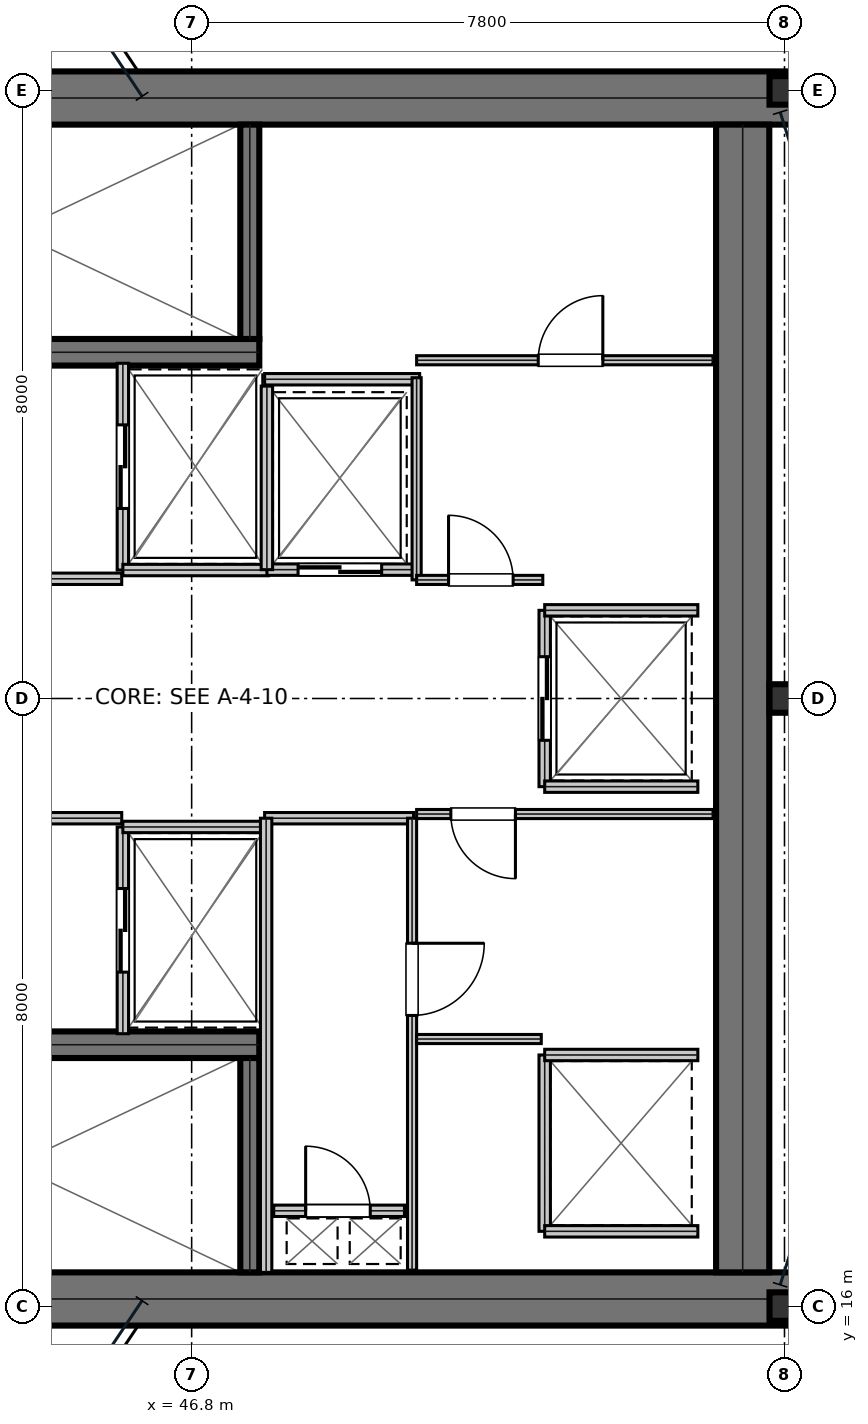
"""IFC4 building model, lengths in metres.
Left out: names, types, materials, properties, quantities, classifications, styles, units other than length and angle.
Written with IfcOpenShell. Run it as: python <this file> out.ifc"""

import sys

from ifc_helpers import new_model, si_unit, direction, frame, frame_2d, origin, origin_2d, place, context, subcontext, project, spatial, rectangle, i_section, extrude, element, fill, save


model = new_model("IFC4")
c1 = context("Model", 3, precision=1e-05, world=origin(), true_north=direction((0.0, 1.0)))
c2 = subcontext(c1, "Body", "Model", "MODEL_VIEW")
j1 = project(units=[si_unit("LENGTHUNIT", "METRE"), si_unit("PLANEANGLEUNIT", "RADIAN")], contexts=[c1])
p1 = place(None, origin())
s1 = spatial("IfcSite", under=j1, at=p1, CompositionType="ELEMENT")
p2 = place(p1, origin())
s2 = spatial("IfcBuilding", under=s1, at=p2, CompositionType="ELEMENT")
p3 = place(p2, frame((0.0, 0.0, 208.05)))
s3 = spatial("IfcBuildingStorey", under=s2, at=p3, CompositionType="ELEMENT", Elevation=208.05)
for number, where, z_axis, x_axis in (
    (1, (38.8, 31.9, 0.0), (0.0, 0.0, 1.0), (1.0, 0.0, 0.0)),
    (2, (38.8, 16.1, 0.0), (0.0, 0.0, 1.0), (1.0, 0.0, 0.0)),
):
    element("IfcWall", number, at=place(p3, frame(where, z_axis=z_axis, x_axis=x_axis)), inside=s3, PredefinedType="SHEAR", context=c2, shape_type="SweptSolid", body=[
        extrude(rectangle(XDim=16.0, YDim=0.7, at=frame_2d((8.0, 0.0))), origin(), (0.0, 0.0, 1.0), 3.79),
    ])
p4 = place(p3, frame((54.05, 16.45, 0.0), z_axis=(0.0, 0.0, 1.0), x_axis=(0.0, 1.0, 0.0)))
e3 = element("IfcWall", 3, at=p4, inside=s3, PredefinedType="SHEAR", context=c2, shape_type="SweptSolid", body=[
    extrude(rectangle(XDim=15.1, YDim=0.7, at=frame_2d((7.55, 0.0))), origin(), (0.0, 0.0, 1.0), 3.79),
])
p5 = place(p3, frame((39.98, 28.555, 0.0), z_axis=(0.0, 0.0, 1.0), x_axis=(1.0, 0.0, 0.0)))
e4 = element("IfcWall", 4, at=p5, inside=s3, PredefinedType="SHEAR", context=c2, shape_type="SweptSolid", body=[
    extrude(rectangle(XDim=7.71, YDim=0.35, at=frame_2d((3.855, 0.0))), origin(), (0.0, 0.0, 1.0), 3.79),
])
p6 = place(p5, frame((0.25, 0.0, 0.0)))
e5 = element("IfcOpeningElement", 5, at=p6, cuts=e4, PredefinedType="OPENING", context=c2, shape_type="SweptSolid", body=[
    extrude(rectangle(XDim=1.1, YDim=2.15, at=frame_2d((0.55, 1.075))), frame((0.0, 0.185, 0.0), z_axis=(0.0, -1.0, 0.0), x_axis=(1.0, 0.0, 0.0)), (0.0, 0.0, 1.0), 0.37),
])
p7 = place(p3, frame((39.98, 19.445, 0.0), z_axis=(0.0, 0.0, 1.0), x_axis=(1.0, 0.0, 0.0)))
e6 = element("IfcWall", 6, at=p7, inside=s3, PredefinedType="SHEAR", context=c2, shape_type="SweptSolid", body=[
    extrude(rectangle(XDim=7.71, YDim=0.35, at=frame_2d((3.855, 0.0))), origin(), (0.0, 0.0, 1.0), 3.79),
])
p8 = place(p7, frame((0.25, 0.0, 0.0)))
e7 = element("IfcOpeningElement", 7, at=p8, cuts=e6, PredefinedType="OPENING", context=c2, shape_type="SweptSolid", body=[
    extrude(rectangle(XDim=1.1, YDim=2.15, at=frame_2d((0.55, 1.075))), frame((0.0, 0.185, 0.0), z_axis=(0.0, -1.0, 0.0), x_axis=(1.0, 0.0, 0.0)), (0.0, 0.0, 1.0), 0.37),
])
for number, where, z_axis, x_axis in (
    (8, (47.565, 28.73, 0.0), (0.0, 0.0, 1.0), (0.0, 1.0, 0.0)),
    (9, (47.565, 16.45, 0.0), (0.0, 0.0, 1.0), (0.0, 1.0, 0.0)),
):
    element("IfcWall", number, at=place(p3, frame(where, z_axis=z_axis, x_axis=x_axis)), inside=s3, PredefinedType="SHEAR", context=c2, shape_type="SweptSolid", body=[
        extrude(rectangle(XDim=2.82, YDim=0.25, at=frame_2d((1.41, 0.0))), origin(), (0.0, 0.0, 1.0), 3.79),
    ])
for number, where, z_axis, x_axis in (
    (10, (54.6, 16.0, 0.0), (0.0, 0.0, 1.0), (1.0, 0.0, 0.0)),
    (11, (54.6, 24.0, 0.0), (0.0, 0.0, 1.0), (1.0, 0.0, 0.0)),
    (12, (54.6, 32.0, 0.0), (0.0, 0.0, 1.0), (1.0, 0.0, 0.0)),
):
    element("IfcColumn", number, at=place(p3, frame(where, z_axis=z_axis, x_axis=x_axis)), inside=s3, PredefinedType="COLUMN", context=c2, shape_type="SweptSolid", body=[
        extrude(i_section(OverallWidth=0.394, OverallDepth=0.375, WebThickness=0.017, FlangeThickness=0.028, at=origin_2d()), origin(), (0.0, 0.0, 1.0), 4.044),
    ])
p9 = place(p3, frame((39.98, 25.575, 0.0), z_axis=(0.0, 0.0, 1.0), x_axis=(1.0, 0.0, 0.0)))
e13 = element("IfcWall", 13, at=p9, inside=s3, PredefinedType="PARTITIONING", context=c2, shape_type="SweptSolid", body=[
    extrude(rectangle(XDim=5.9, YDim=0.15, at=frame_2d((2.95, 0.0))), origin(), (0.0, 0.0, 1.0), 3.79),
])
p10 = place(p9, frame((2.35, 0.0, 0.0)))
e14 = element("IfcOpeningElement", 14, at=p10, cuts=e13, PredefinedType="OPENING", context=c2, shape_type="SweptSolid", body=[
    extrude(rectangle(XDim=1.05, YDim=2.15, at=frame_2d((0.525, 1.075))), frame((0.0, 0.085, 0.0), z_axis=(0.0, -1.0, 0.0), x_axis=(1.0, 0.0, 0.0)), (0.0, 0.0, 1.0), 0.17),
])
p11 = place(p3, frame((39.98, 22.425, 0.0), z_axis=(0.0, 0.0, 1.0), x_axis=(1.0, 0.0, 0.0)))
e15 = element("IfcWall", 15, at=p11, inside=s3, PredefinedType="PARTITIONING", context=c2, shape_type="SweptSolid", body=[
    extrude(rectangle(XDim=5.9, YDim=0.15, at=frame_2d((2.95, 0.0))), origin(), (0.0, 0.0, 1.0), 3.79),
])
p12 = place(p11, frame((2.35, 0.0, 0.0)))
e16 = element("IfcOpeningElement", 16, at=p12, cuts=e15, PredefinedType="OPENING", context=c2, shape_type="SweptSolid", body=[
    extrude(rectangle(XDim=1.05, YDim=2.15, at=frame_2d((0.525, 1.075))), frame((0.0, 0.085, 0.0), z_axis=(0.0, -1.0, 0.0), x_axis=(1.0, 0.0, 0.0)), (0.0, 0.0, 1.0), 0.17),
])
p13 = place(p3, frame((45.895, 25.69, 0.0), z_axis=(0.0, 0.0, 1.0), x_axis=(0.0, 1.0, 0.0)))
e17 = element("IfcWall", 17, at=p13, inside=s3, PredefinedType="PARTITIONING", context=c2, shape_type="SweptSolid", body=[
    extrude(rectangle(XDim=2.72, YDim=0.15, at=frame_2d((1.36, 0.0))), origin(), (0.0, 0.0, 1.0), 3.79),
])
p14 = place(p13, frame((0.81, 0.0, 0.0)))
e18 = element("IfcOpeningElement", 18, at=p14, cuts=e17, PredefinedType="OPENING", context=c2, shape_type="SweptSolid", body=[
    extrude(rectangle(XDim=1.1, YDim=2.15, at=frame_2d((0.55, 1.075))), frame((0.0, 0.085, 0.0), z_axis=(0.0, -1.0, 0.0), x_axis=(1.0, 0.0, 0.0)), (0.0, 0.0, 1.0), 0.17),
])
p15 = place(p3, frame((45.895, 25.69, 0.0), z_axis=(0.0, 0.0, 1.0), x_axis=(1.0, 0.0, 0.0)))
e19 = element("IfcWall", 19, at=p15, inside=s3, PredefinedType="PARTITIONING", context=c2, shape_type="SweptSolid", body=[
    extrude(rectangle(XDim=1.915, YDim=0.15, at=frame_2d((0.958, 0.0))), origin(), (0.0, 0.0, 1.0), 3.79),
])
p16 = place(p3, frame((45.895, 19.59, 0.0), z_axis=(0.0, 0.0, 1.0), x_axis=(0.0, 1.0, 0.0)))
e20 = element("IfcWall", 20, at=p16, inside=s3, PredefinedType="PARTITIONING", context=c2, shape_type="SweptSolid", body=[
    extrude(rectangle(XDim=2.72, YDim=0.15, at=frame_2d((1.36, 0.0))), origin(), (0.0, 0.0, 1.0), 3.79),
])
p17 = place(p16, frame((0.81, 0.0, 0.0)))
e21 = element("IfcOpeningElement", 21, at=p17, cuts=e20, PredefinedType="OPENING", context=c2, shape_type="SweptSolid", body=[
    extrude(rectangle(XDim=1.1, YDim=2.15, at=frame_2d((0.55, 1.075))), frame((0.0, 0.085, 0.0), z_axis=(0.0, -1.0, 0.0), x_axis=(1.0, 0.0, 0.0)), (0.0, 0.0, 1.0), 0.17),
])
p18 = place(p3, frame((45.895, 22.31, 0.0), z_axis=(0.0, 0.0, 1.0), x_axis=(1.0, 0.0, 0.0)))
e22 = element("IfcWall", 22, at=p18, inside=s3, PredefinedType="PARTITIONING", context=c2, shape_type="SweptSolid", body=[
    extrude(rectangle(XDim=1.915, YDim=0.15, at=frame_2d((0.958, 0.0))), origin(), (0.0, 0.0, 1.0), 3.79),
])
p19 = place(p3, frame((47.79, 25.695, 0.0), z_axis=(0.0, 0.0, 1.0), x_axis=(1.0, 0.0, 0.0)))
e23 = element("IfcWall", 23, at=p19, inside=s3, PredefinedType="PARTITIONING", context=c2, shape_type="SweptSolid", body=[
    extrude(rectangle(XDim=1.92, YDim=0.15, at=frame_2d((0.96, 0.0))), origin(), (0.0, 0.0, 1.0), 3.79),
])
p20 = place(p19, frame((0.41, 0.0, 0.0)))
e24 = element("IfcOpeningElement", 24, at=p20, cuts=e23, PredefinedType="OPENING", context=c2, shape_type="SweptSolid", body=[
    extrude(rectangle(XDim=1.1, YDim=2.15, at=frame_2d((0.55, 1.075))), frame((0.0, 0.085, 0.0), z_axis=(0.0, -1.0, 0.0), x_axis=(1.0, 0.0, 0.0)), (0.0, 0.0, 1.0), 0.17),
])
p21 = place(p3, frame((47.79, 25.695, 0.0), z_axis=(0.0, 0.0, 1.0), x_axis=(0.0, 1.0, 0.0)))
e25 = element("IfcWall", 25, at=p21, inside=s3, PredefinedType="PARTITIONING", context=c2, shape_type="SweptSolid", body=[
    extrude(rectangle(XDim=2.415, YDim=0.15, at=frame_2d((1.208, 0.0))), origin(), (0.0, 0.0, 1.0), 3.79),
])
p22 = place(p3, frame((51.445, 22.84, 0.0), z_axis=(0.0, 0.0, 1.0), x_axis=(0.0, 1.0, 0.0)))
e26 = element("IfcWall", 26, at=p22, inside=s3, PredefinedType="PARTITIONING", context=c2, shape_type="SweptSolid", body=[
    extrude(rectangle(XDim=2.32, YDim=0.15, at=frame_2d((1.16, 0.0))), origin(), (0.0, 0.0, 1.0), 3.79),
])
p23 = place(p22, frame((0.61, 0.0, 0.0)))
e27 = element("IfcOpeningElement", 27, at=p23, cuts=e26, PredefinedType="OPENING", context=c2, shape_type="SweptSolid", body=[
    extrude(rectangle(XDim=1.1, YDim=2.15, at=frame_2d((0.55, 1.075))), frame((0.0, 0.085, 0.0), z_axis=(0.0, -1.0, 0.0), x_axis=(1.0, 0.0, 0.0)), (0.0, 0.0, 1.0), 0.17),
])
for number, where, z_axis, x_axis in (
    (28, (51.445, 22.84, 0.0), (0.0, 0.0, 1.0), (1.0, 0.0, 0.0)),
    (29, (51.445, 25.16, 0.0), (0.0, 0.0, 1.0), (1.0, 0.0, 0.0)),
):
    element("IfcWall", number, at=place(p3, frame(where, z_axis=z_axis, x_axis=x_axis)), inside=s3, PredefinedType="PARTITIONING", context=c2, shape_type="SweptSolid", body=[
        extrude(rectangle(XDim=2.015, YDim=0.15, at=frame_2d((1.007, 0.0))), origin(), (0.0, 0.0, 1.0), 3.79),
    ])
p24 = place(p3, frame((51.445, 16.99, 0.0), z_axis=(0.0, 0.0, 1.0), x_axis=(0.0, 1.0, 0.0)))
e30 = element("IfcWall", 30, at=p24, inside=s3, PredefinedType="PARTITIONING", context=c2, shape_type="SweptSolid", body=[
    extrude(rectangle(XDim=2.32, YDim=0.15, at=frame_2d((1.16, 0.0))), origin(), (0.0, 0.0, 1.0), 3.79),
])
for number, where, z_axis, x_axis in (
    (31, (51.445, 16.99, 0.0), (0.0, 0.0, 1.0), (1.0, 0.0, 0.0)),
    (32, (51.445, 19.31, 0.0), (0.0, 0.0, 1.0), (1.0, 0.0, 0.0)),
):
    element("IfcWall", number, at=place(p3, frame(where, z_axis=z_axis, x_axis=x_axis)), inside=s3, PredefinedType="PARTITIONING", context=c2, shape_type="SweptSolid", body=[
        extrude(rectangle(XDim=2.015, YDim=0.15, at=frame_2d((1.007, 0.0))), origin(), (0.0, 0.0, 1.0), 3.79),
    ])
p25 = place(p3, frame((47.88, 17.26, 0.0), z_axis=(0.0, 0.0, 1.0), x_axis=(1.0, 0.0, 0.0)))
e33 = element("IfcWall", 33, at=p25, inside=s3, PredefinedType="PARTITIONING", context=c2, shape_type="SweptSolid", body=[
    extrude(rectangle(XDim=1.72, YDim=0.15, at=frame_2d((0.86, 0.0))), origin(), (0.0, 0.0, 1.0), 3.79),
])
p26 = place(p25, frame((0.42, 0.0, 0.0)))
e34 = element("IfcOpeningElement", 34, at=p26, cuts=e33, PredefinedType="OPENING", context=c2, shape_type="SweptSolid", body=[
    extrude(rectangle(XDim=0.85, YDim=2.15, at=frame_2d((0.425, 1.075))), frame((0.0, 0.085, 0.0), z_axis=(0.0, -1.0, 0.0), x_axis=(1.0, 0.0, 0.0)), (0.0, 0.0, 1.0), 0.17),
])
p27 = place(p3, frame((47.76, 22.425, 0.0), z_axis=(0.0, 0.0, 1.0), x_axis=(1.0, 0.0, 0.0)))
e35 = element("IfcWall", 35, at=p27, inside=s3, PredefinedType="PARTITIONING", context=c2, shape_type="SweptSolid", body=[
    extrude(rectangle(XDim=1.96, YDim=0.15, at=frame_2d((0.98, 0.0))), origin(), (0.0, 0.0, 1.0), 3.79),
])
p28 = place(p3, frame((47.78, 16.45, 0.0), z_axis=(0.0, 0.0, 1.0), x_axis=(0.0, 1.0, 0.0)))
e36 = element("IfcWall", 36, at=p28, inside=s3, PredefinedType="PARTITIONING", context=c2, shape_type="SweptSolid", body=[
    extrude(rectangle(XDim=5.975, YDim=0.15, at=frame_2d((2.988, 0.0))), origin(), (0.0, 0.0, 1.0), 3.79),
])
p29 = place(p3, frame((49.7, 16.48, 0.0), z_axis=(0.0, 0.0, 1.0), x_axis=(0.0, 1.0, 0.0)))
e37 = element("IfcWall", 37, at=p29, inside=s3, PredefinedType="PARTITIONING", context=c2, shape_type="SweptSolid", body=[
    extrude(rectangle(XDim=5.945, YDim=0.12, at=frame_2d((2.973, 0.0))), origin(), (0.0, 0.0, 1.0), 3.79),
])
p30 = place(p29, frame((3.35, 0.0, 0.0)))
e38 = element("IfcOpeningElement", 38, at=p30, cuts=e37, PredefinedType="OPENING", context=c2, shape_type="SweptSolid", body=[
    extrude(rectangle(XDim=0.95, YDim=2.15, at=frame_2d((0.475, 1.075))), frame((0.0, 0.07, 0.0), z_axis=(0.0, -1.0, 0.0), x_axis=(1.0, 0.0, 0.0)), (0.0, 0.0, 1.0), 0.14),
])
p31 = place(p3, frame((49.76, 22.48, 0.0), z_axis=(0.0, 0.0, 1.0), x_axis=(1.0, 0.0, 0.0)))
e39 = element("IfcWall", 39, at=p31, inside=s3, PredefinedType="PARTITIONING", context=c2, shape_type="SweptSolid", body=[
    extrude(rectangle(XDim=3.9, YDim=0.12, at=frame_2d((1.95, 0.0))), origin(), (0.0, 0.0, 1.0), 3.79),
])
p32 = place(p31, frame((0.45, 0.0, 0.0)))
e40 = element("IfcOpeningElement", 40, at=p32, cuts=e39, PredefinedType="OPENING", context=c2, shape_type="SweptSolid", body=[
    extrude(rectangle(XDim=0.85, YDim=2.15, at=frame_2d((0.425, 1.075))), frame((0.0, 0.07, 0.0), z_axis=(0.0, -1.0, 0.0), x_axis=(1.0, 0.0, 0.0)), (0.0, 0.0, 1.0), 0.14),
])
p33 = place(p3, frame((49.76, 19.52, 0.0), z_axis=(0.0, 0.0, 1.0), x_axis=(1.0, 0.0, 0.0)))
e41 = element("IfcWall", 41, at=p33, inside=s3, PredefinedType="PARTITIONING", context=c2, shape_type="SweptSolid", body=[
    extrude(rectangle(XDim=1.64, YDim=0.12, at=frame_2d((0.82, 0.0))), origin(), (0.0, 0.0, 1.0), 3.79),
])
p34 = place(p3, frame((47.76, 28.2, 0.0), z_axis=(0.0, 0.0, 1.0), x_axis=(1.0, 0.0, 0.0)))
e42 = element("IfcWall", 42, at=p34, inside=s3, PredefinedType="PARTITIONING", context=c2, shape_type="SweptSolid", body=[
    extrude(rectangle(XDim=2.04, YDim=0.15, at=frame_2d((1.02, 0.0))), origin(), (0.0, 0.0, 1.0), 3.79),
])
p35 = place(p3, frame((49.76, 25.56, 0.0), z_axis=(0.0, 0.0, 1.0), x_axis=(0.0, 1.0, 0.0)))
e43 = element("IfcWall", 43, at=p35, inside=s3, PredefinedType="PARTITIONING", context=c2, shape_type="SweptSolid", body=[
    extrude(rectangle(XDim=2.66, YDim=0.12, at=frame_2d((1.33, 0.0))), origin(), (0.0, 0.0, 1.0), 3.79),
])
p36 = place(p3, frame((49.76, 25.56, 0.0), z_axis=(0.0, 0.0, 1.0), x_axis=(1.0, 0.0, 0.0)))
e44 = element("IfcWall", 44, at=p36, inside=s3, PredefinedType="PARTITIONING", context=c2, shape_type="SweptSolid", body=[
    extrude(rectangle(XDim=1.66, YDim=0.12, at=frame_2d((0.83, 0.0))), origin(), (0.0, 0.0, 1.0), 3.79),
])
p37 = place(p36, frame((0.42, 0.0, 0.0)))
e45 = element("IfcOpeningElement", 45, at=p37, cuts=e44, PredefinedType="OPENING", context=c2, shape_type="SweptSolid", body=[
    extrude(rectangle(XDim=0.85, YDim=2.15, at=frame_2d((0.425, 1.075))), frame((0.0, 0.07, 0.0), z_axis=(0.0, -1.0, 0.0), x_axis=(1.0, 0.0, 0.0)), (0.0, 0.0, 1.0), 0.14),
])
p38 = place(p3, frame((49.76, 28.45, 0.0), z_axis=(0.0, 0.0, 1.0), x_axis=(1.0, 0.0, 0.0)))
e46 = element("IfcWall", 46, at=p38, inside=s3, PredefinedType="PARTITIONING", context=c2, shape_type="SweptSolid", body=[
    extrude(rectangle(XDim=3.9, YDim=0.12, at=frame_2d((1.95, 0.0))), origin(), (0.0, 0.0, 1.0), 3.79),
])
p39 = place(p38, frame((1.6, 0.0, 0.0)))
e47 = element("IfcOpeningElement", 47, at=p39, cuts=e46, PredefinedType="OPENING", context=c2, shape_type="SweptSolid", body=[
    extrude(rectangle(XDim=0.85, YDim=2.15, at=frame_2d((0.425, 1.075))), frame((0.0, 0.07, 0.0), z_axis=(0.0, -1.0, 0.0), x_axis=(1.0, 0.0, 0.0)), (0.0, 0.0, 1.0), 0.14),
])
p40 = place(p14, frame((1.1, 0.0, 0.0), z_axis=(0.0, 0.0, 1.0), x_axis=(-1.0, 0.0, 0.0)))
e48 = element("IfcDoor", 48, at=p40, inside=s3, OperationType="DOUBLE_DOOR_SLIDING", PredefinedType="DOOR", context=c2, shape_type="SweptSolid", body=[
    extrude(rectangle(XDim=1.1, YDim=2.15, at=frame_2d((0.55, 1.075))), frame((0.0, 0.025, 0.0), z_axis=(0.0, -1.0, 0.0), x_axis=(1.0, 0.0, 0.0)), (0.0, 0.0, 1.0), 0.05),
])
fill(e18, e48)
p41 = place(p17, frame((1.1, 0.0, 0.0), z_axis=(0.0, 0.0, 1.0), x_axis=(-1.0, 0.0, 0.0)))
e49 = element("IfcDoor", 49, at=p41, inside=s3, OperationType="DOUBLE_DOOR_SLIDING", PredefinedType="DOOR", context=c2, shape_type="SweptSolid", body=[
    extrude(rectangle(XDim=1.1, YDim=2.15, at=frame_2d((0.55, 1.075))), frame((0.0, 0.025, 0.0), z_axis=(0.0, -1.0, 0.0), x_axis=(1.0, 0.0, 0.0)), (0.0, 0.0, 1.0), 0.05),
])
fill(e21, e49)
p42 = place(p20, frame((1.1, 0.0, 0.0), z_axis=(0.0, 0.0, 1.0), x_axis=(-1.0, 0.0, 0.0)))
e50 = element("IfcDoor", 50, at=p42, inside=s3, OperationType="DOUBLE_DOOR_SLIDING", PredefinedType="DOOR", context=c2, shape_type="SweptSolid", body=[
    extrude(rectangle(XDim=1.1, YDim=2.15, at=frame_2d((0.55, 1.075))), frame((0.0, 0.025, 0.0), z_axis=(0.0, -1.0, 0.0), x_axis=(1.0, 0.0, 0.0)), (0.0, 0.0, 1.0), 0.05),
])
fill(e24, e50)
p43 = place(p23, frame((1.1, 0.0, 0.0), z_axis=(0.0, 0.0, 1.0), x_axis=(-1.0, 0.0, 0.0)))
e51 = element("IfcDoor", 51, at=p43, inside=s3, OperationType="DOUBLE_DOOR_SLIDING", PredefinedType="DOOR", context=c2, shape_type="SweptSolid", body=[
    extrude(rectangle(XDim=1.1, YDim=2.15, at=frame_2d((0.55, 1.075))), frame((0.0, 0.025, 0.0), z_axis=(0.0, -1.0, 0.0), x_axis=(1.0, 0.0, 0.0)), (0.0, 0.0, 1.0), 0.05),
])
fill(e27, e51)
p44 = place(p26, origin())
e52 = element("IfcDoor", 52, at=p44, inside=s3, OperationType="SINGLE_SWING_LEFT", PredefinedType="TRAPDOOR", context=c2, shape_type="SweptSolid", body=[
    extrude(rectangle(XDim=0.85, YDim=2.15, at=frame_2d((0.425, 1.075))), frame((0.0, 0.025, 0.0), z_axis=(0.0, -1.0, 0.0), x_axis=(1.0, 0.0, 0.0)), (0.0, 0.0, 1.0), 0.05),
])
fill(e34, e52)
p45 = place(p30, frame((0.95, 0.0, 0.0), z_axis=(0.0, 0.0, 1.0), x_axis=(-1.0, 0.0, 0.0)))
e53 = element("IfcDoor", 53, at=p45, inside=s3, OperationType="SINGLE_SWING_LEFT", PredefinedType="DOOR", context=c2, shape_type="SweptSolid", body=[
    extrude(rectangle(XDim=0.95, YDim=2.15, at=frame_2d((0.475, 1.075))), frame((0.0, 0.025, 0.0), z_axis=(0.0, -1.0, 0.0), x_axis=(1.0, 0.0, 0.0)), (0.0, 0.0, 1.0), 0.05),
])
fill(e38, e53)
p46 = place(p32, frame((0.85, 0.0, 0.0), z_axis=(0.0, 0.0, 1.0), x_axis=(-1.0, 0.0, 0.0)))
e54 = element("IfcDoor", 54, at=p46, inside=s3, OperationType="SINGLE_SWING_LEFT", PredefinedType="DOOR", context=c2, shape_type="SweptSolid", body=[
    extrude(rectangle(XDim=0.85, YDim=2.15, at=frame_2d((0.425, 1.075))), frame((0.0, 0.025, 0.0), z_axis=(0.0, -1.0, 0.0), x_axis=(1.0, 0.0, 0.0)), (0.0, 0.0, 1.0), 0.05),
])
fill(e40, e54)
p47 = place(p37, origin())
e55 = element("IfcDoor", 55, at=p47, inside=s3, OperationType="SINGLE_SWING_LEFT", PredefinedType="DOOR", context=c2, shape_type="SweptSolid", body=[
    extrude(rectangle(XDim=0.85, YDim=2.15, at=frame_2d((0.425, 1.075))), frame((0.0, 0.025, 0.0), z_axis=(0.0, -1.0, 0.0), x_axis=(1.0, 0.0, 0.0)), (0.0, 0.0, 1.0), 0.05),
])
fill(e45, e55)
p48 = place(p39, origin())
e56 = element("IfcDoor", 56, at=p48, inside=s3, OperationType="SINGLE_SWING_RIGHT", PredefinedType="DOOR", context=c2, shape_type="SweptSolid", body=[
    extrude(rectangle(XDim=0.85, YDim=2.15, at=frame_2d((0.425, 1.075))), frame((0.0, 0.025, 0.0), z_axis=(0.0, -1.0, 0.0), x_axis=(1.0, 0.0, 0.0)), (0.0, 0.0, 1.0), 0.05),
])
fill(e47, e56)
save(model, sys.argv[1])
